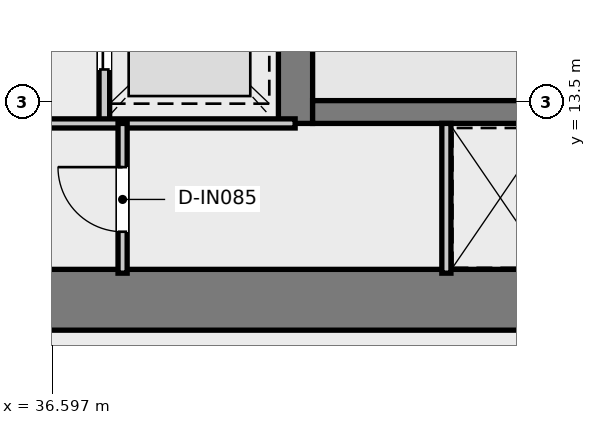
"""IFC4 building model, lengths in metres.
Left out: names, types, materials, properties, quantities, classifications, styles, units other than length and angle.
Written with IfcOpenShell. Run it as: python <this file> out.ifc"""

import sys

from ifc_helpers import new_model, si_unit, direction, frame, frame_2d, origin, place, context, subcontext, project, spatial, rectangle, extrude, element, fill, save


model = new_model("IFC4")
c1 = context("Model", 3, precision=1e-05, world=origin(), true_north=direction((0.0, 1.0)))
c2 = subcontext(c1, "Body", "Model", "MODEL_VIEW")
j1 = project(units=[si_unit("LENGTHUNIT", "METRE"), si_unit("PLANEANGLEUNIT", "RADIAN")], contexts=[c1])
p1 = place(None, origin())
s1 = spatial("IfcSite", under=j1, at=p1, CompositionType="ELEMENT")
p2 = place(p1, origin())
s2 = spatial("IfcBuilding", under=s1, at=p2, CompositionType="ELEMENT")
p3 = place(p2, frame((0.0, 0.0, 201.5)))
s3 = spatial("IfcBuildingStorey", under=s2, at=p3, CompositionType="ELEMENT", Elevation=201.5)
p4 = place(p3, frame((28.08, 10.9, 0.0), z_axis=(0.0, 0.0, 1.0), x_axis=(1.0, 0.0, 0.0)))
e1 = element("IfcWall", 1, at=p4, inside=s3, PredefinedType="SHEAR", context=c2, shape_type="SweptSolid", body=[
    extrude(rectangle(XDim=15.84, YDim=0.8, at=frame_2d((7.92, 0.0))), origin(), (0.0, 0.0, 1.0), 5.8),
])
p5 = place(p3, frame((39.795, 13.22, 0.0), z_axis=(0.0, 0.0, 1.0), x_axis=(0.0, 1.0, 0.0)))
e2 = element("IfcWall", 2, at=p5, inside=s3, PredefinedType="SHEAR", context=c2, shape_type="SweptSolid", body=[
    extrude(rectangle(XDim=12.78, YDim=0.45, at=frame_2d((6.39, 0.0))), origin(), (0.0, 0.0, 1.0), 5.8),
])
p6 = place(p5, frame((10.58, 0.0, 0.0)))
e3 = element("IfcOpeningElement", 3, at=p6, cuts=e2, PredefinedType="OPENING", context=c2, shape_type="SweptSolid", body=[
    extrude(rectangle(XDim=1.1, YDim=2.15, at=frame_2d((0.55, 1.075))), frame((0.0, 0.235, 0.0), z_axis=(0.0, -1.0, 0.0), x_axis=(1.0, 0.0, 0.0)), (0.0, 0.0, 1.0), 0.47),
])
p7 = place(p3, frame((40.02, 13.37, 0.0), z_axis=(0.0, 0.0, 1.0), x_axis=(1.0, 0.0, 0.0)))
e4 = element("IfcWall", 4, at=p7, inside=s3, PredefinedType="SHEAR", context=c2, shape_type="SweptSolid", body=[
    extrude(rectangle(XDim=3.1, YDim=0.3, at=frame_2d((1.55, 0.0))), origin(), (0.0, 0.0, 1.0), 5.8),
])
p8 = place(p3, frame((37.28, 13.22, 0.0), z_axis=(0.0, 0.0, 1.0), x_axis=(0.0, 1.0, 0.0)))
e5 = element("IfcWall", 5, at=p8, inside=s3, PredefinedType="PARTITIONING", context=c2, shape_type="SweptSolid", body=[
    extrude(rectangle(XDim=4.56, YDim=0.14, at=frame_2d((2.28, 0.0))), origin(), (0.0, 0.0, 1.0), 5.52),
])
p9 = place(p8, frame((0.71, 0.0, 0.0)))
e6 = element("IfcOpeningElement", 6, at=p9, cuts=e5, PredefinedType="OPENING", context=c2, shape_type="SweptSolid", body=[
    extrude(rectangle(XDim=1.1, YDim=2.15, at=frame_2d((0.55, 1.075))), frame((0.0, 0.08, 0.0), z_axis=(0.0, -1.0, 0.0), x_axis=(1.0, 0.0, 0.0)), (0.0, 0.0, 1.0), 0.16),
])
p10 = place(p8, frame((2.91, 0.0, 0.0)))
e7 = element("IfcOpeningElement", 7, at=p10, cuts=e5, PredefinedType="OPENING", context=c2, shape_type="SweptSolid", body=[
    extrude(rectangle(XDim=1.1, YDim=2.15, at=frame_2d((0.55, 1.075))), frame((0.0, 0.08, 0.0), z_axis=(0.0, -1.0, 0.0), x_axis=(1.0, 0.0, 0.0)), (0.0, 0.0, 1.0), 0.16),
])
p11 = place(p3, frame((41.78, 11.25, 0.0), z_axis=(0.0, 0.0, 1.0), x_axis=(0.0, 1.0, 0.0)))
e8 = element("IfcWall", 8, at=p11, inside=s3, PredefinedType="PARTITIONING", context=c2, shape_type="SweptSolid", body=[
    extrude(rectangle(XDim=1.97, YDim=0.12, at=frame_2d((0.985, 0.0))), origin(), (0.0, 0.0, 1.0), 5.52),
])
p12 = place(p3, frame((32.21, 13.22, 0.0), z_axis=(0.0, 0.0, 1.0), x_axis=(1.0, 0.0, 0.0)))
e9 = element("IfcWall", 9, at=p12, inside=s3, PredefinedType="PARTITIONING", context=c2, shape_type="SweptSolid", body=[
    extrude(rectangle(XDim=7.58, YDim=0.12, at=frame_2d((3.79, 0.0))), origin(), (0.0, 0.0, 1.0), 5.52),
])
p13 = place(p12, frame((3.365, 0.0, 0.0)))
e10 = element("IfcOpeningElement", 10, at=p13, cuts=e9, PredefinedType="OPENING", context=c2, shape_type="SweptSolid", body=[
    extrude(rectangle(XDim=0.85, YDim=2.1, at=frame_2d((0.425, 1.05))), frame((0.0, 0.07, 0.0), z_axis=(0.0, -1.0, 0.0), x_axis=(1.0, 0.0, 0.0)), (0.0, 0.0, 1.0), 0.14),
])
p14 = place(p3, frame((37.52, 11.25, 0.0), z_axis=(0.0, 0.0, 1.0), x_axis=(0.0, 1.0, 0.0)))
e11 = element("IfcWall", 11, at=p14, inside=s3, PredefinedType="PARTITIONING", context=c2, shape_type="SweptSolid", body=[
    extrude(rectangle(XDim=1.97, YDim=0.12, at=frame_2d((0.985, 0.0))), origin(), (0.0, 0.0, 1.0), 5.52),
])
p15 = place(p14, frame((0.545, 0.0, 0.0)))
e12 = element("IfcOpeningElement", 12, at=p15, cuts=e11, PredefinedType="OPENING", context=c2, shape_type="SweptSolid", body=[
    extrude(rectangle(XDim=0.85, YDim=2.1, at=frame_2d((0.425, 1.05))), frame((0.0, 0.07, 0.0), z_axis=(0.0, -1.0, 0.0), x_axis=(1.0, 0.0, 0.0)), (0.0, 0.0, 1.0), 0.14),
])
p16 = place(p9, origin())
e13 = element("IfcDoor", 13, at=p16, inside=s3, OperationType="DOUBLE_DOOR_SLIDING", PredefinedType="DOOR", context=c2, shape_type="SweptSolid", body=[
    extrude(rectangle(XDim=1.1, YDim=2.15, at=frame_2d((0.55, 1.075))), frame((0.0, 0.025, 0.0), z_axis=(0.0, -1.0, 0.0), x_axis=(1.0, 0.0, 0.0)), (0.0, 0.0, 1.0), 0.05),
])
fill(e6, e13)
p17 = place(p15, origin())
e14 = element("IfcDoor", 14, at=p17, inside=s3, OperationType="SINGLE_SWING_RIGHT", PredefinedType="DOOR", context=c2, shape_type="SweptSolid", body=[
    extrude(rectangle(XDim=0.85, YDim=2.1, at=frame_2d((0.425, 1.05))), frame((0.0, 0.025, 0.0), z_axis=(0.0, -1.0, 0.0), x_axis=(1.0, 0.0, 0.0)), (0.0, 0.0, 1.0), 0.05),
])
fill(e12, e14)
save(model, sys.argv[1])
